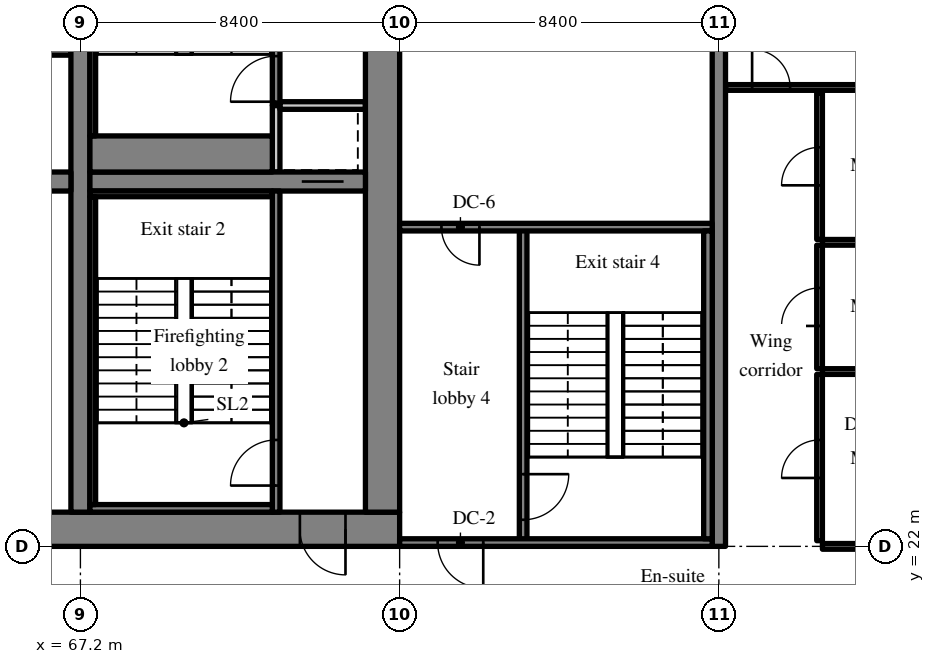
"""IFC4 building model, lengths in metres.
Left out: names, types, materials, properties, quantities, classifications, styles, units other than length and angle.
Written with IfcOpenShell. Run it as: python <this file> out.ifc"""

import sys

from ifc_helpers import new_model, si_unit, direction, frame, frame_2d, origin, place, context, subcontext, project, spatial, rectangle, extrude, source, transform, mapped, element, fill, save


model = new_model("IFC4")
c1 = context("Model", 3, precision=1e-05, world=origin(), true_north=direction((0.0, 1.0)))
c2 = subcontext(c1, "Body", "Model", "MODEL_VIEW")
j1 = project(units=[si_unit("LENGTHUNIT", "METRE"), si_unit("PLANEANGLEUNIT", "RADIAN")], contexts=[c1])
p1 = place(None, origin())
s1 = spatial("IfcSite", under=j1, at=p1, CompositionType="ELEMENT")
p2 = place(p1, origin())
s2 = spatial("IfcBuilding", under=s1, at=p2, CompositionType="ELEMENT")
p3 = place(p2, frame((0.0, 0.0, 129.4)))
s3 = spatial("IfcBuildingStorey", under=s2, at=p3, CompositionType="ELEMENT", Elevation=129.4)
m1 = source(origin(), c2, "Body", "SweptSolid", [
    extrude(rectangle(XDim=50.4, YDim=0.9, at=frame_2d((25.2, 0.0))), origin(), (0.0, 0.0, 1.0), 3.52),
])
p4 = place(p3, frame((25.2, 22.45, 0.0), z_axis=(0.0, 0.0, 1.0), x_axis=(1.0, 0.0, 0.0)))
e1 = element("IfcWall", 1, at=p4, inside=s3, PredefinedType="SHEAR", context=c2, shape_type="MappedRepresentation", body=[
    mapped(m1, transform((0.0, 0.0, 0.0), scale=1.0)),
])
m2 = source(origin(), c2, "Body", "SweptSolid", [
    extrude(rectangle(XDim=1.8, YDim=2.1, at=frame_2d((0.9, 1.05))), frame((0.0, 0.46, 0.0), z_axis=(0.0, -1.0, 0.0), x_axis=(1.0, 0.0, 0.0)), (0.0, 0.0, 1.0), 0.92),
])
p5 = place(p4, frame((15.9, 0.0, 0.0)))
e2 = element("IfcOpeningElement", 2, at=p5, cuts=e1, PredefinedType="OPENING", context=c2, shape_type="MappedRepresentation", body=[
    mapped(m2, transform((0.0, 0.0, 0.0), scale=1.0)),
])
m3 = source(origin(), c2, "Body", "SweptSolid", [
    extrude(rectangle(XDim=1.2, YDim=2.1, at=frame_2d((0.6, 1.05))), frame((0.0, 0.46, 0.0), z_axis=(0.0, -1.0, 0.0), x_axis=(1.0, 0.0, 0.0)), (0.0, 0.0, 1.0), 0.92),
])
p6 = place(p4, frame((26.975, 0.0, 0.0)))
e3 = element("IfcOpeningElement", 3, at=p6, cuts=e1, PredefinedType="OPENING", context=c2, shape_type="MappedRepresentation", body=[
    mapped(m3, transform((0.0, 0.0, 0.0), scale=1.0)),
])
m4 = source(origin(), c2, "Body", "SweptSolid", [
    extrude(rectangle(XDim=0.9, YDim=2.1, at=frame_2d((0.45, 1.05))), frame((0.0, 0.46, 0.0), z_axis=(0.0, -1.0, 0.0), x_axis=(1.0, 0.0, 0.0)), (0.0, 0.0, 1.0), 0.92),
])
p7 = place(p4, frame((33.75, 0.0, 0.0)))
e4 = element("IfcOpeningElement", 4, at=p7, cuts=e1, PredefinedType="OPENING", context=c2, shape_type="MappedRepresentation", body=[
    mapped(m4, transform((0.0, 0.0, 0.0), scale=1.0)),
])
p8 = place(p4, frame((30.75, 0.0, 0.0)))
e5 = element("IfcOpeningElement", 5, at=p8, cuts=e1, PredefinedType="OPENING", context=c2, shape_type="MappedRepresentation", body=[
    mapped(m4, transform((0.0, 0.0, 0.0), scale=1.0)),
])
p9 = place(p4, frame((38.275, 0.0, 0.0)))
e6 = element("IfcOpeningElement", 6, at=p9, cuts=e1, PredefinedType="OPENING", context=c2, shape_type="MappedRepresentation", body=[
    mapped(m4, transform((0.0, 0.0, 0.0), scale=1.0)),
])
p10 = place(p4, frame((6.45, 0.0, 0.0)))
e7 = element("IfcOpeningElement", 7, at=p10, cuts=e1, PredefinedType="OPENING", context=c2, shape_type="MappedRepresentation", body=[
    mapped(m3, transform((0.0, 0.0, 0.0), scale=1.0)),
])
p11 = place(p4, frame((47.775, 0.0, 0.0)))
e8 = element("IfcOpeningElement", 8, at=p11, cuts=e1, PredefinedType="OPENING", context=c2, shape_type="MappedRepresentation", body=[
    mapped(m3, transform((0.0, 0.0, 0.0), scale=1.0)),
])
m5 = source(origin(), c2, "Body", "SweptSolid", [
    extrude(rectangle(XDim=18.2, YDim=0.9, at=frame_2d((9.1, 0.0))), origin(), (0.0, 0.0, 1.0), 3.52),
])
p12 = place(p3, frame((75.15, 22.9, 0.0), z_axis=(0.0, 0.0, 1.0), x_axis=(0.0, 1.0, 0.0)))
e9 = element("IfcWall", 9, at=p12, inside=s3, PredefinedType="SHEAR", context=c2, shape_type="MappedRepresentation", body=[
    mapped(m5, transform((0.0, 0.0, 0.0), scale=1.0)),
])
p13 = place(p12, frame((12.5, 0.0, 0.0)))
e10 = element("IfcOpeningElement", 10, at=p13, cuts=e9, PredefinedType="OPENING", context=c2, shape_type="MappedRepresentation", body=[
    mapped(m3, transform((0.0, 0.0, 0.0), scale=1.0)),
])
m6 = source(origin(), c2, "Body", "SweptSolid", [
    extrude(rectangle(XDim=18.2, YDim=0.5, at=frame_2d((9.1, 0.0))), origin(), (0.0, 0.0, 1.0), 3.52),
])
p14 = place(p3, frame((67.2, 22.9, 0.0), z_axis=(0.0, 0.0, 1.0), x_axis=(0.0, 1.0, 0.0)))
e11 = element("IfcWall", 11, at=p14, inside=s3, PredefinedType="SHEAR", context=c2, shape_type="MappedRepresentation", body=[
    mapped(m6, transform((0.0, 0.0, 0.0), scale=1.0)),
])
m7 = source(origin(), c2, "Body", "SweptSolid", [
    extrude(rectangle(XDim=16.3, YDim=0.5, at=frame_2d((8.15, 0.0))), origin(), (0.0, 0.0, 1.0), 3.52),
])
p15 = place(p3, frame((50.65, 31.6, 0.0), z_axis=(0.0, 0.0, 1.0), x_axis=(1.0, 0.0, 0.0)))
e12 = element("IfcWall", 12, at=p15, inside=s3, PredefinedType="SHEAR", context=c2, shape_type="MappedRepresentation", body=[
    mapped(m7, transform((0.0, 0.0, 0.0), scale=1.0)),
])
m8 = source(origin(), c2, "Body", "SweptSolid", [
    extrude(rectangle(XDim=1.0, YDim=2.1, at=frame_2d((0.5, 1.05))), frame((0.0, 0.26, 0.0), z_axis=(0.0, -1.0, 0.0), x_axis=(1.0, 0.0, 0.0)), (0.0, 0.0, 1.0), 0.52),
])
p16 = place(p15, frame((0.575, 0.0, 0.0)))
e13 = element("IfcOpeningElement", 13, at=p16, cuts=e12, PredefinedType="OPENING", context=c2, shape_type="MappedRepresentation", body=[
    mapped(m8, transform((0.0, 0.0, 0.0), scale=1.0)),
])
m9 = source(origin(), c2, "Body", "SweptSolid", [
    extrude(rectangle(XDim=7.25, YDim=0.5, at=frame_2d((3.625, 0.0))), origin(), (0.0, 0.0, 1.0), 3.52),
])
p17 = place(p3, frame((67.45, 31.6, 0.0), z_axis=(0.0, 0.0, 1.0), x_axis=(1.0, 0.0, 0.0)))
e14 = element("IfcWall", 14, at=p17, inside=s3, PredefinedType="SHEAR", context=c2, shape_type="MappedRepresentation", body=[
    mapped(m9, transform((0.0, 0.0, 0.0), scale=1.0)),
])
m10 = source(origin(), c2, "Body", "SweptSolid", [
    extrude(rectangle(XDim=1.1, YDim=2.1, at=frame_2d((0.55, 1.05))), frame((0.0, 0.26, 0.0), z_axis=(0.0, -1.0, 0.0), x_axis=(1.0, 0.0, 0.0)), (0.0, 0.0, 1.0), 0.52),
])
p18 = place(p17, frame((5.575, 0.0, 0.0)))
e15 = element("IfcOpeningElement", 15, at=p18, cuts=e14, PredefinedType="OPENING", context=c2, shape_type="MappedRepresentation", body=[
    mapped(m10, transform((0.0, 0.0, 0.0), scale=1.0)),
])
m11 = source(origin(), c2, "Body", "SweptSolid", [
    extrude(rectangle(XDim=20.0, YDim=0.35, at=frame_2d((10.0, 0.0))), origin(), (0.0, 0.0, 1.0), 3.52),
])
p19 = place(p3, frame((84.0, 22.0, 0.0), z_axis=(0.0, 0.0, 1.0), x_axis=(0.0, 1.0, 0.0)))
e16 = element("IfcWall", 16, at=p19, inside=s3, PredefinedType="SHEAR", context=c2, shape_type="MappedRepresentation", body=[
    mapped(m11, transform((0.0, 0.0, 0.0), scale=1.0)),
])
m12 = source(origin(), c2, "Body", "SweptSolid", [
    extrude(rectangle(XDim=14.15, YDim=0.15, at=frame_2d((7.075, 0.0))), origin(), (0.0, 0.0, 1.0), 3.52),
])
p20 = place(p3, frame((66.95, 35.0, 0.0), z_axis=(0.0, 0.0, 1.0), x_axis=(-1.0, 0.0, 0.0)))
e17 = element("IfcWall", 17, at=p20, inside=s3, PredefinedType="PARTITIONING", context=c2, shape_type="MappedRepresentation", body=[
    mapped(m12, transform((0.0, 0.0, 0.0), scale=1.0)),
])
m13 = source(origin(), c2, "Body", "SweptSolid", [
    extrude(rectangle(XDim=0.9, YDim=2.1, at=frame_2d((0.45, 1.05))), frame((0.0, 0.085, 0.0), z_axis=(0.0, -1.0, 0.0), x_axis=(1.0, 0.0, 0.0)), (0.0, 0.0, 1.0), 0.17),
])
p21 = place(p20, frame((3.421, 0.0, 0.0)))
e18 = element("IfcOpeningElement", 18, at=p21, cuts=e17, PredefinedType="OPENING", context=c2, shape_type="MappedRepresentation", body=[
    mapped(m13, transform((0.0, 0.0, 0.0), scale=1.0)),
])
p22 = place(p20, frame((10.458, 0.0, 0.0)))
e19 = element("IfcOpeningElement", 19, at=p22, cuts=e17, PredefinedType="OPENING", context=c2, shape_type="MappedRepresentation", body=[
    mapped(m13, transform((0.0, 0.0, 0.0), scale=1.0)),
])
m14 = source(origin(), c2, "Body", "SweptSolid", [
    extrude(rectangle(XDim=8.45, YDim=0.2, at=frame_2d((4.225, 0.0))), origin(), (0.0, 0.0, 1.0), 3.52),
])
p23 = place(p3, frame((72.35, 22.9, 0.0), z_axis=(0.0, 0.0, 1.0), x_axis=(0.0, 1.0, 0.0)))
e20 = element("IfcWall", 20, at=p23, inside=s3, PredefinedType="SOLIDWALL", context=c2, shape_type="MappedRepresentation", body=[
    mapped(m14, transform((0.0, 0.0, 0.0), scale=1.0)),
])
m15 = source(origin(), c2, "Body", "SweptSolid", [
    extrude(rectangle(XDim=1.2, YDim=2.1, at=frame_2d((0.6, 1.05))), frame((0.0, 0.11, 0.0), z_axis=(0.0, -1.0, 0.0), x_axis=(1.0, 0.0, 0.0)), (0.0, 0.0, 1.0), 0.22),
])
p24 = place(p23, frame((0.7, 0.0, 0.0)))
e21 = element("IfcOpeningElement", 21, at=p24, cuts=e20, PredefinedType="OPENING", context=c2, shape_type="MappedRepresentation", body=[
    mapped(m15, transform((0.0, 0.0, 0.0), scale=1.0)),
])
m16 = source(origin(), c2, "Body", "SweptSolid", [
    extrude(rectangle(XDim=1.75, YDim=0.2, at=frame_2d((0.875, 0.0))), origin(), (0.0, 0.0, 1.0), 3.52),
])
p25 = place(p3, frame((72.35, 31.85, 0.0), z_axis=(0.0, 0.0, 1.0), x_axis=(0.0, 1.0, 0.0)))
e22 = element("IfcWall", 22, at=p25, inside=s3, PredefinedType="SOLIDWALL", context=c2, shape_type="MappedRepresentation", body=[
    mapped(m16, transform((0.0, 0.0, 0.0), scale=1.0)),
])
m17 = source(origin(), c2, "Body", "SweptSolid", [
    extrude(rectangle(XDim=2.25, YDim=0.2, at=frame_2d((1.125, 0.0))), origin(), (0.0, 0.0, 1.0), 3.52),
])
p26 = place(p3, frame((72.45, 33.6, 0.0), z_axis=(0.0, 0.0, 1.0), x_axis=(1.0, 0.0, 0.0)))
e23 = element("IfcWall", 23, at=p26, inside=s3, PredefinedType="SOLIDWALL", context=c2, shape_type="MappedRepresentation", body=[
    mapped(m17, transform((0.0, 0.0, 0.0), scale=1.0)),
])
m18 = source(origin(), c2, "Body", "SweptSolid", [
    extrude(rectangle(XDim=7.5, YDim=0.2, at=frame_2d((3.75, 0.0))), origin(), (0.0, 0.0, 1.0), 3.52),
])
p27 = place(p3, frame((72.35, 33.6, 0.0), z_axis=(0.0, 0.0, 1.0), x_axis=(0.0, 1.0, 0.0)))
e24 = element("IfcWall", 24, at=p27, inside=s3, PredefinedType="SOLIDWALL", context=c2, shape_type="MappedRepresentation", body=[
    mapped(m18, transform((0.0, 0.0, 0.0), scale=1.0)),
])
p28 = place(p27, frame((0.1, 0.0, 0.0)))
e25 = element("IfcOpeningElement", 25, at=p28, cuts=e24, PredefinedType="OPENING", context=c2, shape_type="MappedRepresentation", body=[
    mapped(m15, transform((0.0, 0.0, 0.0), scale=1.0)),
])
m19 = source(origin(), c2, "Body", "SweptSolid", [
    extrude(rectangle(XDim=8.3, YDim=0.2, at=frame_2d((4.15, 0.0))), origin(), (0.0, 0.0, 1.0), 3.52),
])
p29 = place(p3, frame((78.85, 22.1, 0.0), z_axis=(0.0, 0.0, 1.0), x_axis=(0.0, 1.0, 0.0)))
e26 = element("IfcWall", 26, at=p29, inside=s3, PredefinedType="SOLIDWALL", context=c2, shape_type="MappedRepresentation", body=[
    mapped(m19, transform((0.0, 0.0, 0.0), scale=1.0)),
])
p30 = place(p29, frame((0.6, 0.0, 0.0)))
e27 = element("IfcOpeningElement", 27, at=p30, cuts=e26, PredefinedType="OPENING", context=c2, shape_type="MappedRepresentation", body=[
    mapped(m15, transform((0.0, 0.0, 0.0), scale=1.0)),
])
m20 = source(origin(), c2, "Body", "SweptSolid", [
    extrude(rectangle(XDim=8.225, YDim=0.2, at=frame_2d((4.112, 0.0))), origin(), (0.0, 0.0, 1.0), 3.52),
])
p31 = place(p3, frame((83.825, 22.1, 0.0), z_axis=(0.0, 0.0, 1.0), x_axis=(-1.0, 0.0, 0.0)))
e28 = element("IfcWall", 28, at=p31, inside=s3, PredefinedType="SOLIDWALL", context=c2, shape_type="MappedRepresentation", body=[
    mapped(m20, transform((0.0, 0.0, 0.0), scale=1.0)),
])
p32 = place(p31, frame((6.025, 0.0, 0.0)))
e29 = element("IfcOpeningElement", 29, at=p32, cuts=e28, PredefinedType="OPENING", context=c2, shape_type="MappedRepresentation", body=[
    mapped(m15, transform((0.0, 0.0, 0.0), scale=1.0)),
])
p33 = place(p3, frame((83.825, 30.4, 0.0), z_axis=(0.0, 0.0, 1.0), x_axis=(-1.0, 0.0, 0.0)))
e30 = element("IfcWall", 30, at=p33, inside=s3, PredefinedType="SOLIDWALL", context=c2, shape_type="MappedRepresentation", body=[
    mapped(m20, transform((0.0, 0.0, 0.0), scale=1.0)),
])
m21 = source(origin(), c2, "Body", "SweptSolid", [
    extrude(rectangle(XDim=1.0, YDim=2.1, at=frame_2d((0.5, 1.05))), frame((0.0, 0.11, 0.0), z_axis=(0.0, -1.0, 0.0), x_axis=(1.0, 0.0, 0.0)), (0.0, 0.0, 1.0), 0.22),
])
p34 = place(p33, frame((6.125, 0.0, 0.0)))
e31 = element("IfcOpeningElement", 31, at=p34, cuts=e30, PredefinedType="OPENING", context=c2, shape_type="MappedRepresentation", body=[
    mapped(m21, transform((0.0, 0.0, 0.0), scale=1.0)),
])
m22 = source(origin(), c2, "Body", "SweptSolid", [
    extrude(rectangle(XDim=4.8, YDim=0.2, at=frame_2d((2.4, 0.0))), origin(), (0.0, 0.0, 1.0), 3.52),
])
p35 = place(p3, frame((67.45, 23.0, 0.0), z_axis=(0.0, 0.0, 1.0), x_axis=(1.0, 0.0, 0.0)))
e32 = element("IfcWall", 32, at=p35, inside=s3, PredefinedType="SOLIDWALL", context=c2, shape_type="MappedRepresentation", body=[
    mapped(m22, transform((0.0, 0.0, 0.0), scale=1.0)),
])
m23 = source(origin(), c2, "Body", "SweptSolid", [
    extrude(rectangle(XDim=4.8, YDim=0.15, at=frame_2d((2.4, 0.0))), origin(), (0.0, 0.0, 1.0), 3.52),
])
p36 = place(p3, frame((67.45, 31.275, 0.0), z_axis=(0.0, 0.0, 1.0), x_axis=(1.0, 0.0, 0.0)))
e33 = element("IfcWall", 33, at=p36, inside=s3, PredefinedType="SOLIDWALL", context=c2, shape_type="MappedRepresentation", body=[
    mapped(m23, transform((0.0, 0.0, 0.0), scale=1.0)),
])
m24 = source(origin(), c2, "Body", "SweptSolid", [
    extrude(rectangle(XDim=8.1, YDim=0.15, at=frame_2d((4.05, 0.0))), origin(), (0.0, 0.0, 1.0), 3.52),
])
p37 = place(p3, frame((67.525, 23.1, 0.0), z_axis=(0.0, 0.0, 1.0), x_axis=(0.0, 1.0, 0.0)))
e34 = element("IfcWall", 34, at=p37, inside=s3, PredefinedType="SOLIDWALL", context=c2, shape_type="MappedRepresentation", body=[
    mapped(m24, transform((0.0, 0.0, 0.0), scale=1.0)),
])
m25 = source(origin(), c2, "Body", "SweptSolid", [
    extrude(rectangle(XDim=4.8, YDim=0.95, at=frame_2d((2.4, 0.0))), origin(), (0.0, 0.0, 1.0), 3.52),
])
p38 = place(p3, frame((67.45, 32.325, 0.0), z_axis=(0.0, 0.0, 1.0), x_axis=(1.0, 0.0, 0.0)))
e35 = element("IfcWall", 35, at=p38, inside=s3, PredefinedType="SOLIDWALL", context=c2, shape_type="MappedRepresentation", body=[
    mapped(m25, transform((0.0, 0.0, 0.0), scale=1.0)),
])
p39 = place(p3, frame((67.525, 32.8, 0.0), z_axis=(0.0, 0.0, 1.0), x_axis=(0.0, 1.0, 0.0)))
e36 = element("IfcWall", 36, at=p39, inside=s3, PredefinedType="SOLIDWALL", context=c2, shape_type="MappedRepresentation", body=[
    mapped(m24, transform((0.0, 0.0, 0.0), scale=1.0)),
])
m26 = source(origin(), c2, "Body", "SweptSolid", [
    extrude(rectangle(XDim=8.1, YDim=0.225, at=frame_2d((4.05, 0.0))), origin(), (0.0, 0.0, 1.0), 3.52),
])
p40 = place(p3, frame((83.713, 22.2, 0.0), z_axis=(0.0, 0.0, 1.0), x_axis=(0.0, 1.0, 0.0)))
e37 = element("IfcWall", 37, at=p40, inside=s3, PredefinedType="SOLIDWALL", context=c2, shape_type="MappedRepresentation", body=[
    mapped(m26, transform((0.0, 0.0, 0.0), scale=1.0)),
])
m27 = source(origin(), c2, "Body", "SweptSolid", [
    extrude(rectangle(XDim=5.5, YDim=0.15, at=frame_2d((2.75, 0.0))), origin(), (0.0, 0.0, 1.0), 2.82),
])
p41 = place(p3, frame((86.725, 22.0, 0.0), z_axis=(0.0, 0.0, 1.0), x_axis=(1.0, 0.0, 0.0)))
e38 = element("IfcWall", 38, at=p41, inside=s3, PredefinedType="PARTITIONING", context=c2, shape_type="MappedRepresentation", body=[
    mapped(m27, transform((0.0, 0.0, 0.0), scale=1.0)),
])
m28 = source(origin(), c2, "Body", "SweptSolid", [
    extrude(rectangle(XDim=4.375, YDim=0.15, at=frame_2d((2.188, 0.0))), origin(), (0.0, 0.0, 1.0), 3.52),
])
p42 = place(p3, frame((86.65, 22.15, 0.0), z_axis=(0.0, 0.0, 1.0), x_axis=(0.0, 1.0, 0.0)))
e39 = element("IfcWall", 39, at=p42, inside=s3, PredefinedType="PARTITIONING", context=c2, shape_type="MappedRepresentation", body=[
    mapped(m28, transform((0.0, 0.0, 0.0), scale=1.0)),
])
m29 = source(origin(), c2, "Body", "SweptSolid", [
    extrude(rectangle(XDim=1.0, YDim=2.1, at=frame_2d((0.5, 1.05))), frame((0.0, 0.085, 0.0), z_axis=(0.0, -1.0, 0.0), x_axis=(1.0, 0.0, 0.0)), (0.0, 0.0, 1.0), 0.17),
])
p43 = place(p42, frame((1.65, 0.0, 0.0)))
e40 = element("IfcOpeningElement", 40, at=p43, cuts=e39, PredefinedType="OPENING", context=c2, shape_type="MappedRepresentation", body=[
    mapped(m29, transform((0.0, 0.0, 0.0), scale=1.0)),
])
m30 = source(origin(), c2, "Body", "SweptSolid", [
    extrude(rectangle(XDim=5.5, YDim=0.15, at=frame_2d((2.75, 0.0))), origin(), (0.0, 0.0, 1.0), 3.52),
])
p44 = place(p3, frame((86.725, 26.6, 0.0), z_axis=(0.0, 0.0, 1.0), x_axis=(1.0, 0.0, 0.0)))
e41 = element("IfcWall", 41, at=p44, inside=s3, PredefinedType="PARTITIONING", context=c2, shape_type="MappedRepresentation", body=[
    mapped(m30, transform((0.0, 0.0, 0.0), scale=1.0)),
])
m31 = source(origin(), c2, "Body", "SweptSolid", [
    extrude(rectangle(XDim=3.25, YDim=0.15, at=frame_2d((1.625, 0.0))), origin(), (0.0, 0.0, 1.0), 3.52),
])
p45 = place(p3, frame((86.65, 26.675, 0.0), z_axis=(0.0, 0.0, 1.0), x_axis=(0.0, 1.0, 0.0)))
e42 = element("IfcWall", 42, at=p45, inside=s3, PredefinedType="PARTITIONING", context=c2, shape_type="MappedRepresentation", body=[
    mapped(m31, transform((0.0, 0.0, 0.0), scale=1.0)),
])
p46 = place(p45, frame((1.125, 0.0, 0.0)))
e43 = element("IfcOpeningElement", 43, at=p46, cuts=e42, PredefinedType="OPENING", context=c2, shape_type="MappedRepresentation", body=[
    mapped(m29, transform((0.0, 0.0, 0.0), scale=1.0)),
])
p47 = place(p3, frame((86.725, 30.0, 0.0), z_axis=(0.0, 0.0, 1.0), x_axis=(1.0, 0.0, 0.0)))
e44 = element("IfcWall", 44, at=p47, inside=s3, PredefinedType="PARTITIONING", context=c2, shape_type="MappedRepresentation", body=[
    mapped(m30, transform((0.0, 0.0, 0.0), scale=1.0)),
])
m32 = source(origin(), c2, "Body", "SweptSolid", [
    extrude(rectangle(XDim=3.85, YDim=0.15, at=frame_2d((1.925, 0.0))), origin(), (0.0, 0.0, 1.0), 3.52),
])
p48 = place(p3, frame((86.65, 30.075, 0.0), z_axis=(0.0, 0.0, 1.0), x_axis=(0.0, 1.0, 0.0)))
e45 = element("IfcWall", 45, at=p48, inside=s3, PredefinedType="PARTITIONING", context=c2, shape_type="MappedRepresentation", body=[
    mapped(m32, transform((0.0, 0.0, 0.0), scale=1.0)),
])
p49 = place(p48, frame((1.425, 0.0, 0.0)))
e46 = element("IfcOpeningElement", 46, at=p49, cuts=e45, PredefinedType="OPENING", context=c2, shape_type="MappedRepresentation", body=[
    mapped(m29, transform((0.0, 0.0, 0.0), scale=1.0)),
])
m33 = source(origin(), c2, "Body", "SweptSolid", [
    extrude(rectangle(XDim=8.05, YDim=0.15, at=frame_2d((4.025, 0.0))), origin(), (0.0, 0.0, 1.0), 3.52),
])
p50 = place(p3, frame((84.175, 34.075, 0.0), z_axis=(0.0, 0.0, 1.0), x_axis=(1.0, 0.0, 0.0)))
e47 = element("IfcWall", 47, at=p50, inside=s3, PredefinedType="PARTITIONING", context=c2, shape_type="MappedRepresentation", body=[
    mapped(m33, transform((0.0, 0.0, 0.0), scale=1.0)),
])
p51 = place(p50, frame((0.7, 0.0, 0.0)))
e48 = element("IfcOpeningElement", 48, at=p51, cuts=e47, PredefinedType="OPENING", context=c2, shape_type="MappedRepresentation", body=[
    mapped(m29, transform((0.0, 0.0, 0.0), scale=1.0)),
])
m34 = source(origin(), c2, "Body", "SweptSolid", [
    extrude(rectangle(XDim=1.2, YDim=2.1, at=frame_2d((0.6, 1.05))), frame((0.0, 0.025, 0.0), z_axis=(0.0, -1.0, 0.0), x_axis=(1.0, 0.0, 0.0)), (0.0, 0.0, 1.0), 0.05),
])
p52 = place(p24, origin())
e49 = element("IfcDoor", 49, at=p52, inside=s3, OperationType="SINGLE_SWING_LEFT", PredefinedType="DOOR", context=c2, shape_type="MappedRepresentation", body=[
    mapped(m34, transform((0.0, 0.0, 0.0), scale=1.0)),
])
fill(e21, e49)
m35 = source(origin(), c2, "Body", "SweptSolid", [
    extrude(rectangle(XDim=1.2, YDim=2.1, at=frame_2d((0.6, 1.05))), frame((0.0, 0.375, 0.0), z_axis=(0.0, -1.0, 0.0), x_axis=(1.0, 0.0, 0.0)), (0.0, 0.0, 1.0), 0.05),
])
p53 = place(p11, origin())
e50 = element("IfcDoor", 50, at=p53, inside=s3, OperationType="SINGLE_SWING_RIGHT", PredefinedType="DOOR", context=c2, shape_type="MappedRepresentation", body=[
    mapped(m35, transform((0.0, 0.0, 0.0), scale=1.0)),
])
fill(e8, e50)
m36 = source(origin(), c2, "Body", "SweptSolid", [
    extrude(rectangle(XDim=1.1, YDim=2.1, at=frame_2d((0.55, 1.05))), frame((0.0, 0.025, 0.0), z_axis=(0.0, -1.0, 0.0), x_axis=(1.0, 0.0, 0.0)), (0.0, 0.0, 1.0), 0.05),
])
p54 = place(p18, origin())
e51 = element("IfcDoor", 51, at=p54, inside=s3, OperationType="SLIDING_TO_LEFT", PredefinedType="DOOR", context=c2, shape_type="MappedRepresentation", body=[
    mapped(m36, transform((0.0, 0.0, 0.0), scale=1.0)),
])
fill(e15, e51)
p55 = place(p28, origin())
e52 = element("IfcDoor", 52, at=p55, inside=s3, OperationType="SINGLE_SWING_LEFT", PredefinedType="DOOR", context=c2, shape_type="MappedRepresentation", body=[
    mapped(m34, transform((0.0, 0.0, 0.0), scale=1.0)),
])
fill(e25, e52)
p56 = place(p30, origin())
e53 = element("IfcDoor", 53, at=p56, inside=s3, OperationType="SINGLE_SWING_RIGHT", PredefinedType="DOOR", context=c2, shape_type="MappedRepresentation", body=[
    mapped(m34, transform((0.0, 0.0, 0.0), scale=1.0)),
])
fill(e27, e53)
p57 = place(p32, origin())
e54 = element("IfcDoor", 54, at=p57, inside=s3, OperationType="SINGLE_SWING_LEFT", PredefinedType="DOOR", context=c2, shape_type="MappedRepresentation", body=[
    mapped(m34, transform((0.0, 0.0, 0.0), scale=1.0)),
])
fill(e29, e54)
m37 = source(origin(), c2, "Body", "SweptSolid", [
    extrude(rectangle(XDim=1.0, YDim=2.1, at=frame_2d((0.5, 1.05))), frame((0.0, 0.025, 0.0), z_axis=(0.0, -1.0, 0.0), x_axis=(1.0, 0.0, 0.0)), (0.0, 0.0, 1.0), 0.05),
])
p58 = place(p34, origin())
e55 = element("IfcDoor", 55, at=p58, inside=s3, OperationType="SINGLE_SWING_LEFT", PredefinedType="DOOR", context=c2, shape_type="MappedRepresentation", body=[
    mapped(m37, transform((0.0, 0.0, 0.0), scale=1.0)),
])
fill(e31, e55)
p59 = place(p43, origin())
e56 = element("IfcDoor", 56, at=p59, inside=s3, OperationType="SINGLE_SWING_LEFT", PredefinedType="DOOR", context=c2, shape_type="MappedRepresentation", body=[
    mapped(m37, transform((0.0, 0.0, 0.0), scale=1.0)),
])
fill(e40, e56)
p60 = place(p46, origin())
e57 = element("IfcDoor", 57, at=p60, inside=s3, OperationType="SINGLE_SWING_LEFT", PredefinedType="DOOR", context=c2, shape_type="MappedRepresentation", body=[
    mapped(m37, transform((0.0, 0.0, 0.0), scale=1.0)),
])
fill(e43, e57)
p61 = place(p49, origin())
e58 = element("IfcDoor", 58, at=p61, inside=s3, OperationType="SINGLE_SWING_LEFT", PredefinedType="DOOR", context=c2, shape_type="MappedRepresentation", body=[
    mapped(m37, transform((0.0, 0.0, 0.0), scale=1.0)),
])
fill(e46, e58)
p62 = place(p51, origin())
e59 = element("IfcDoor", 59, at=p62, inside=s3, OperationType="SINGLE_SWING_LEFT", PredefinedType="DOOR", context=c2, shape_type="MappedRepresentation", body=[
    mapped(m37, transform((0.0, 0.0, 0.0), scale=1.0)),
])
fill(e48, e59)
save(model, sys.argv[1])
